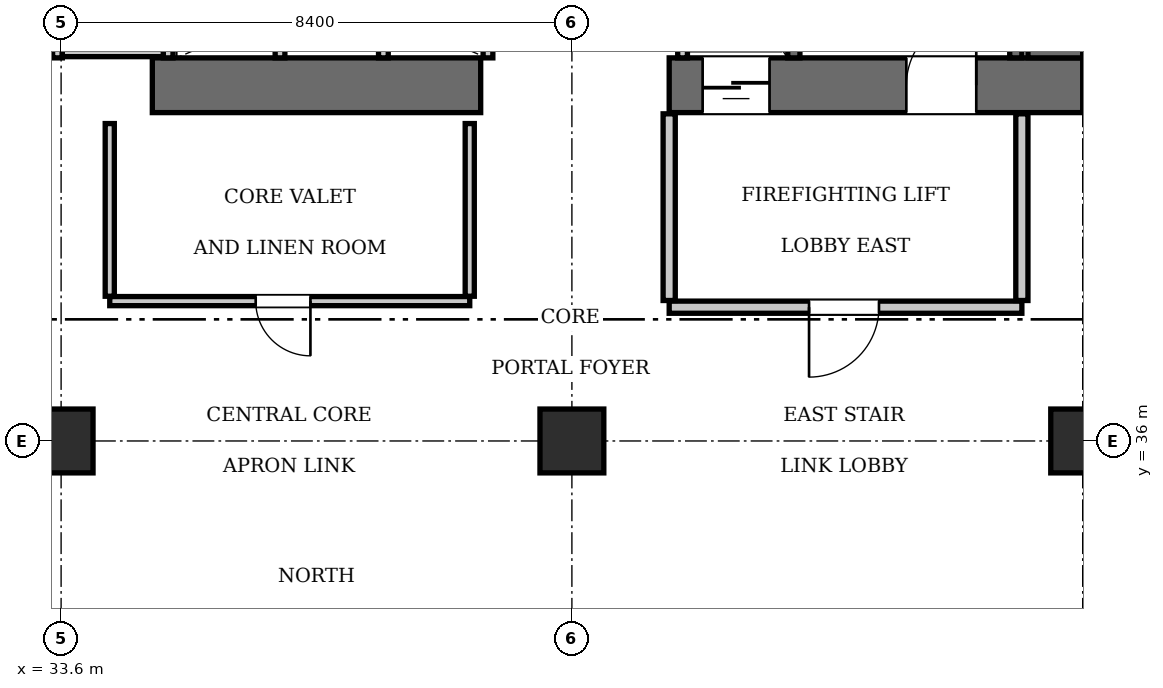
"""IFC4 building model, lengths in metres.
Left out: names, types, materials, properties, quantities, classifications, styles, units other than length and angle.
Written with IfcOpenShell. Run it as: python <this file> out.ifc"""

import sys

from ifc_helpers import new_model, si_unit, direction, frame, frame_2d, origin, origin_2d, place, context, subcontext, project, spatial, rectangle, extrude, element, fill, save


model = new_model("IFC4")
c1 = context("Model", 3, precision=1e-05, world=origin(), true_north=direction((0.0, 1.0)))
c2 = subcontext(c1, "Body", "Model", "MODEL_VIEW")
j1 = project(units=[si_unit("LENGTHUNIT", "METRE"), si_unit("PLANEANGLEUNIT", "RADIAN")], contexts=[c1])
p1 = place(None, origin())
s1 = spatial("IfcSite", under=j1, at=p1, CompositionType="ELEMENT")
p2 = place(p1, origin())
s2 = spatial("IfcBuilding", under=s1, at=p2, CompositionType="ELEMENT")
p3 = place(p2, frame((0.0, 0.0, 53.9)))
s3 = spatial("IfcBuildingStorey", under=s2, at=p3, CompositionType="ELEMENT", Elevation=53.9)
p4 = place(p3, frame((35.1, 41.85, 0.0), z_axis=(0.0, 0.0, 1.0), x_axis=(1.0, 0.0, 0.0)))
e1 = element("IfcWall", 1, at=p4, inside=s3, PredefinedType="SHEAR", context=c2, shape_type="SweptSolid", body=[
    extrude(rectangle(XDim=5.4, YDim=0.9, at=frame_2d((2.7, 0.0))), origin(), (0.0, 0.0, 1.0), 3.85),
])
p5 = place(p3, frame((43.6, 41.85, 0.0), z_axis=(0.0, 0.0, 1.0), x_axis=(1.0, 0.0, 0.0)))
e2 = element("IfcWall", 2, at=p5, inside=s3, PredefinedType="SHEAR", context=c2, shape_type="SweptSolid", body=[
    extrude(rectangle(XDim=6.8, YDim=0.9, at=frame_2d((3.4, 0.0))), origin(), (0.0, 0.0, 1.0), 3.85),
])
p6 = place(p5, frame((3.9, 0.0, 0.0)))
e3 = element("IfcOpeningElement", 3, at=p6, cuts=e2, PredefinedType="OPENING", context=c2, shape_type="SweptSolid", body=[
    extrude(rectangle(XDim=1.15, YDim=2.15, at=frame_2d((0.575, 1.075))), frame((0.0, 0.46, 0.0), z_axis=(0.0, -1.0, 0.0), x_axis=(1.0, 0.0, 0.0)), (0.0, 0.0, 1.0), 0.92),
])
p7 = place(p5, frame((0.55, 0.0, 0.0)))
e4 = element("IfcOpeningElement", 4, at=p7, cuts=e2, PredefinedType="OPENING", context=c2, shape_type="SweptSolid", body=[
    extrude(rectangle(XDim=1.1, YDim=2.2, at=frame_2d((0.55, 1.1))), frame((0.0, 0.46, 0.0), z_axis=(0.0, -1.0, 0.0), x_axis=(1.0, 0.0, 0.0)), (0.0, 0.0, 1.0), 0.92),
])
p8 = place(p3, frame((49.95, 42.3, 0.0), z_axis=(0.0, 0.0, 1.0), x_axis=(0.0, 1.0, 0.0)))
e5 = element("IfcWall", 5, at=p8, inside=s3, PredefinedType="SHEAR", context=c2, shape_type="SweptSolid", body=[
    extrude(rectangle(XDim=1.6, YDim=0.9, at=frame_2d((0.8, 0.0))), origin(), (0.0, 0.0, 1.0), 3.85),
])
for number, where, z_axis, x_axis in (
    (6, (33.6, 36.0, 0.0), (0.0, 0.0, 1.0), (1.0, 0.0, 0.0)),
    (7, (42.0, 36.0, 0.0), (0.0, 0.0, 1.0), (1.0, 0.0, 0.0)),
    (8, (50.4, 36.0, 0.0), (0.0, 0.0, 1.0), (1.0, 0.0, 0.0)),
):
    element("IfcColumn", number, at=place(p3, frame(where, z_axis=z_axis, x_axis=x_axis)), inside=s3, PredefinedType="COLUMN", context=c2, shape_type="SweptSolid", body=[
        extrude(rectangle(XDim=1.05, YDim=1.05, at=origin_2d()), origin(), (0.0, 0.0, 1.0), 3.85),
    ])
p9 = place(p3, frame((45.65, 42.3, 0.0), z_axis=(0.0, 0.0, 1.0), x_axis=(0.0, 1.0, 0.0)))
e9 = element("IfcWall", 9, at=p9, inside=s3, PredefinedType="SOLIDWALL", context=c2, shape_type="SweptSolid", body=[
    extrude(rectangle(XDim=8.85, YDim=0.2, at=frame_2d((4.425, 0.0))), origin(), (0.0, 0.0, 1.0), 3.61),
])
p10 = place(p3, frame((49.3, 42.3, 0.0), z_axis=(0.0, 0.0, 1.0), x_axis=(0.0, 1.0, 0.0)))
e10 = element("IfcWall", 10, at=p10, inside=s3, PredefinedType="SOLIDWALL", context=c2, shape_type="SweptSolid", body=[
    extrude(rectangle(XDim=1.58, YDim=0.2, at=frame_2d((0.79, 0.0))), origin(), (0.0, 0.0, 1.0), 3.61),
])
p11 = place(p3, frame((43.82, 42.3, 0.0), z_axis=(0.0, 0.0, 1.0), x_axis=(0.0, 1.0, 0.0)))
e11 = element("IfcWall", 11, at=p11, inside=s3, PredefinedType="SOLIDWALL", context=c2, shape_type="SweptSolid", body=[
    extrude(rectangle(XDim=2.44, YDim=0.16, at=frame_2d((1.22, 0.0))), origin(), (0.0, 0.0, 1.0), 3.61),
])
for number, where, z_axis, x_axis in (
    (12, (37.2, 42.3, 0.0), (0.0, 0.0, 1.0), (0.0, 1.0, 0.0)),
    (13, (38.9, 42.3, 0.0), (0.0, 0.0, 1.0), (0.0, 1.0, 0.0)),
    (14, (40.62, 42.3, 0.0), (0.0, 0.0, 1.0), (0.0, 1.0, 0.0)),
):
    element("IfcWall", number, at=place(p3, frame(where, z_axis=z_axis, x_axis=x_axis)), inside=s3, PredefinedType="SOLIDWALL", context=c2, shape_type="SweptSolid", body=[
        extrude(rectangle(XDim=2.05, YDim=0.16, at=frame_2d((1.025, 0.0))), origin(), (0.0, 0.0, 1.0), 3.61),
    ])
for number, where, z_axis, x_axis in (
    (15, (33.54, 42.3, 0.0), (0.0, 0.0, 1.0), (0.0, 1.0, 0.0)),
    (16, (35.36, 42.3, 0.0), (0.0, 0.0, 1.0), (0.0, 1.0, 0.0)),
):
    element("IfcWall", number, at=place(p3, frame(where, z_axis=z_axis, x_axis=x_axis)), inside=s3, PredefinedType="SOLIDWALL", context=c2, shape_type="SweptSolid", body=[
        extrude(rectangle(XDim=2.1, YDim=0.16, at=frame_2d((1.05, 0.0))), origin(), (0.0, 0.0, 1.0), 3.61),
    ])
p12 = place(p3, frame((33.62, 42.4, 0.0), z_axis=(0.0, 0.0, 1.0), x_axis=(1.0, 0.0, 0.0)))
e17 = element("IfcWall", 17, at=p12, inside=s3, PredefinedType="SOLIDWALL", context=c2, shape_type="SweptSolid", body=[
    extrude(rectangle(XDim=1.66, YDim=0.16, at=frame_2d((0.83, 0.0))), origin(), (0.0, 0.0, 1.0), 3.61),
])
p13 = place(p3, frame((43.6, 38.2, 0.0), z_axis=(0.0, 0.0, 1.0), x_axis=(1.0, 0.0, 0.0)))
e18 = element("IfcWall", 18, at=p13, inside=s3, PredefinedType="PARTITIONING", context=c2, shape_type="SweptSolid", body=[
    extrude(rectangle(XDim=5.8, YDim=0.2, at=frame_2d((2.9, 0.0))), origin(), (0.0, 0.0, 1.0), 3.61),
])
p14 = place(p13, frame((2.3, 0.0, 0.0)))
e19 = element("IfcOpeningElement", 19, at=p14, cuts=e18, PredefinedType="OPENING", context=c2, shape_type="SweptSolid", body=[
    extrude(rectangle(XDim=1.15, YDim=2.15, at=frame_2d((0.575, 1.075))), frame((0.0, 0.11, 0.0), z_axis=(0.0, -1.0, 0.0), x_axis=(1.0, 0.0, 0.0)), (0.0, 0.0, 1.0), 0.22),
])
for number, where, z_axis, x_axis in (
    (20, (43.6, 38.31, 0.0), (0.0, 0.0, 1.0), (0.0, 1.0, 0.0)),
    (21, (49.4, 38.31, 0.0), (0.0, 0.0, 1.0), (0.0, 1.0, 0.0)),
):
    element("IfcWall", number, at=place(p3, frame(where, z_axis=z_axis, x_axis=x_axis)), inside=s3, PredefinedType="PARTITIONING", context=c2, shape_type="SweptSolid", body=[
        extrude(rectangle(XDim=3.07, YDim=0.2, at=frame_2d((1.535, 0.0))), origin(), (0.0, 0.0, 1.0), 3.61),
    ])
p15 = place(p3, frame((34.4, 38.3, 0.0), z_axis=(0.0, 0.0, 1.0), x_axis=(1.0, 0.0, 0.0)))
e22 = element("IfcWall", 22, at=p15, inside=s3, PredefinedType="PARTITIONING", context=c2, shape_type="SweptSolid", body=[
    extrude(rectangle(XDim=5.92, YDim=0.15, at=frame_2d((2.96, 0.0))), origin(), (0.0, 0.0, 1.0), 3.61),
])
p16 = place(p15, frame((2.4, 0.0, 0.0)))
e23 = element("IfcOpeningElement", 23, at=p16, cuts=e22, PredefinedType="OPENING", context=c2, shape_type="SweptSolid", body=[
    extrude(rectangle(XDim=0.9, YDim=2.1, at=frame_2d((0.45, 1.05))), frame((0.0, 0.085, 0.0), z_axis=(0.0, -1.0, 0.0), x_axis=(1.0, 0.0, 0.0)), (0.0, 0.0, 1.0), 0.17),
])
for number, where, z_axis, x_axis in (
    (24, (34.4, 38.38, 0.0), (0.0, 0.0, 1.0), (0.0, 1.0, 0.0)),
    (25, (40.32, 38.38, 0.0), (0.0, 0.0, 1.0), (0.0, 1.0, 0.0)),
):
    element("IfcWall", number, at=place(p3, frame(where, z_axis=z_axis, x_axis=x_axis)), inside=s3, PredefinedType="PARTITIONING", context=c2, shape_type="SweptSolid", body=[
        extrude(rectangle(XDim=2.84, YDim=0.15, at=frame_2d((1.42, 0.0))), origin(), (0.0, 0.0, 1.0), 3.61),
    ])
p17 = place(p6, origin())
e26 = element("IfcDoor", 26, at=p17, inside=s3, OperationType="SINGLE_SWING_RIGHT", PredefinedType="DOOR", context=c2, shape_type="SweptSolid", body=[
    extrude(rectangle(XDim=1.15, YDim=2.15, at=frame_2d((0.575, 1.075))), frame((0.0, 0.025, 0.0), z_axis=(0.0, -1.0, 0.0), x_axis=(1.0, 0.0, 0.0)), (0.0, 0.0, 1.0), 0.05),
])
fill(e3, e26)
p18 = place(p7, frame((1.1, 0.0, 0.0), z_axis=(0.0, 0.0, 1.0), x_axis=(-1.0, 0.0, 0.0)))
e27 = element("IfcDoor", 27, at=p18, inside=s3, OperationType="SLIDING_TO_LEFT", PredefinedType="DOOR", context=c2, shape_type="SweptSolid", body=[
    extrude(rectangle(XDim=1.1, YDim=2.2, at=frame_2d((0.55, 1.1))), frame((0.0, 0.025, 0.0), z_axis=(0.0, -1.0, 0.0), x_axis=(1.0, 0.0, 0.0)), (0.0, 0.0, 1.0), 0.05),
])
fill(e4, e27)
p19 = place(p14, frame((1.15, 0.0, 0.0), z_axis=(0.0, 0.0, 1.0), x_axis=(-1.0, 0.0, 0.0)))
e28 = element("IfcDoor", 28, at=p19, inside=s3, OperationType="SINGLE_SWING_RIGHT", PredefinedType="DOOR", context=c2, shape_type="SweptSolid", body=[
    extrude(rectangle(XDim=1.15, YDim=2.15, at=frame_2d((0.575, 1.075))), frame((0.0, 0.025, 0.0), z_axis=(0.0, -1.0, 0.0), x_axis=(1.0, 0.0, 0.0)), (0.0, 0.0, 1.0), 0.05),
])
fill(e19, e28)
p20 = place(p16, frame((0.9, 0.0, 0.0), z_axis=(0.0, 0.0, 1.0), x_axis=(-1.0, 0.0, 0.0)))
e29 = element("IfcDoor", 29, at=p20, inside=s3, OperationType="SINGLE_SWING_LEFT", PredefinedType="DOOR", context=c2, shape_type="SweptSolid", body=[
    extrude(rectangle(XDim=0.9, YDim=2.1, at=frame_2d((0.45, 1.05))), frame((0.0, 0.025, 0.0), z_axis=(0.0, -1.0, 0.0), x_axis=(1.0, 0.0, 0.0)), (0.0, 0.0, 1.0), 0.05),
])
fill(e23, e29)
save(model, sys.argv[1])
